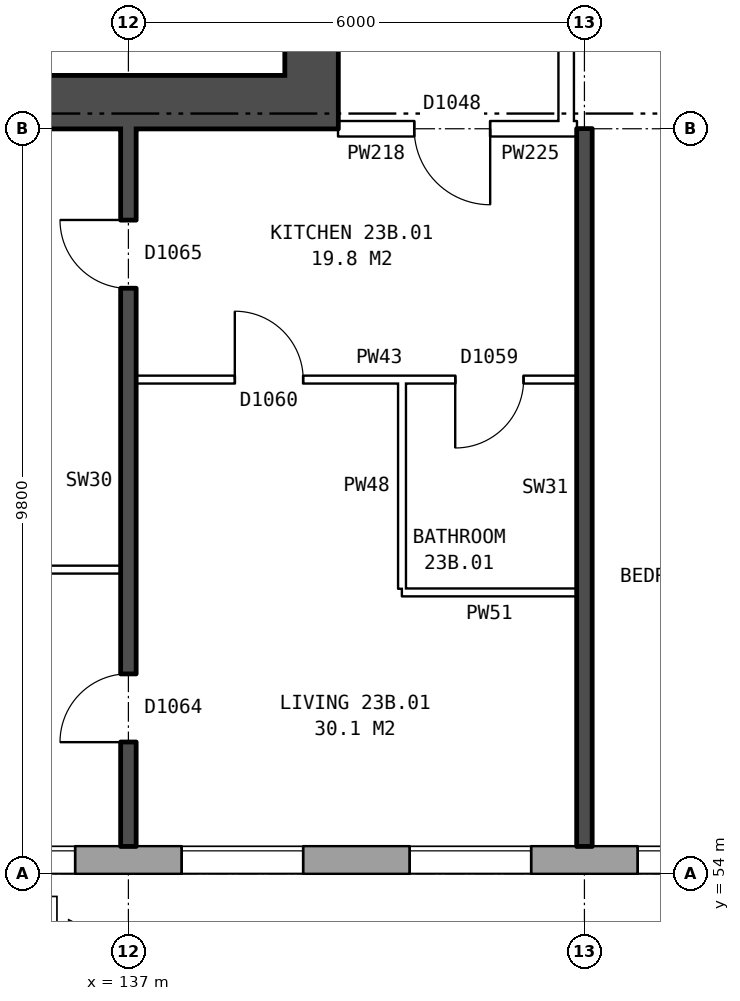
"""IFC4 building model, lengths in metres.
Left out: names, types, materials, properties, quantities, classifications, styles, units other than length and angle.
Written with IfcOpenShell. Run it as: python <this file> out.ifc"""

import sys

from ifc_helpers import new_model, si_unit, direction, frame, frame_2d, origin, place, context, subcontext, project, spatial, rectangle, extrude, element, fill, save


model = new_model("IFC4")
c1 = context("Model", 3, precision=1e-05, world=origin(), true_north=direction((0.0, 1.0)))
c2 = subcontext(c1, "Body", "Model", "MODEL_VIEW")
j1 = project(units=[si_unit("LENGTHUNIT", "METRE"), si_unit("PLANEANGLEUNIT", "RADIAN")], contexts=[c1])
p1 = place(None, origin())
s1 = spatial("IfcSite", under=j1, at=p1, CompositionType="ELEMENT")
p2 = place(p1, origin())
s2 = spatial("IfcBuilding", under=s1, at=p2, CompositionType="ELEMENT")
p3 = place(p2, frame((0.0, 0.0, 84.0)))
s3 = spatial("IfcBuildingStorey", under=s2, at=p3, CompositionType="ELEMENT", Elevation=84.0)
p4 = place(p3, frame((134.075, 54.18, 0.0), z_axis=(0.0, 0.0, 1.0), x_axis=(1.0, 0.0, 0.0)))
e1 = element("IfcWall", 1, at=p4, inside=s3, PredefinedType="STANDARD", context=c2, shape_type="SweptSolid", body=[
    extrude(rectangle(XDim=38.101, YDim=0.36, at=frame_2d((19.05, 0.0))), origin(), (0.0, 0.0, 1.0), 2.85),
])
p5 = place(p4, frame((0.625, 0.0, 0.8)))
e2 = element("IfcOpeningElement", 2, at=p5, cuts=e1, PredefinedType="OPENING", context=c2, shape_type="SweptSolid", body=[
    extrude(rectangle(XDim=1.6, YDim=1.8, at=frame_2d((0.8, 0.9))), frame((0.0, 0.19, 0.0), z_axis=(0.0, -1.0, 0.0), x_axis=(1.0, 0.0, 0.0)), (0.0, 0.0, 1.0), 0.38),
])
p6 = place(p4, frame((3.625, 0.0, 0.8)))
e3 = element("IfcOpeningElement", 3, at=p6, cuts=e1, PredefinedType="OPENING", context=c2, shape_type="SweptSolid", body=[
    extrude(rectangle(XDim=1.6, YDim=1.8, at=frame_2d((0.8, 0.9))), frame((0.0, 0.19, 0.0), z_axis=(0.0, -1.0, 0.0), x_axis=(1.0, 0.0, 0.0)), (0.0, 0.0, 1.0), 0.38),
])
p7 = place(p4, frame((6.625, 0.0, 0.8)))
e4 = element("IfcOpeningElement", 4, at=p7, cuts=e1, PredefinedType="OPENING", context=c2, shape_type="SweptSolid", body=[
    extrude(rectangle(XDim=1.6, YDim=1.8, at=frame_2d((0.8, 0.9))), frame((0.0, 0.19, 0.0), z_axis=(0.0, -1.0, 0.0), x_axis=(1.0, 0.0, 0.0)), (0.0, 0.0, 1.0), 0.38),
])
p8 = place(p4, frame((9.625, 0.0, 0.8)))
e5 = element("IfcOpeningElement", 5, at=p8, cuts=e1, PredefinedType="OPENING", context=c2, shape_type="SweptSolid", body=[
    extrude(rectangle(XDim=1.6, YDim=1.8, at=frame_2d((0.8, 0.9))), frame((0.0, 0.19, 0.0), z_axis=(0.0, -1.0, 0.0), x_axis=(1.0, 0.0, 0.0)), (0.0, 0.0, 1.0), 0.38),
])
p9 = place(p4, frame((12.075, 0.0, 0.8)))
e6 = element("IfcOpeningElement", 6, at=p9, cuts=e1, PredefinedType="OPENING", context=c2, shape_type="SweptSolid", body=[
    extrude(rectangle(XDim=1.4, YDim=1.8, at=frame_2d((0.7, 0.9))), frame((0.0, 0.19, 0.0), z_axis=(0.0, -1.0, 0.0), x_axis=(1.0, 0.0, 0.0)), (0.0, 0.0, 1.0), 0.38),
])
p10 = place(p4, frame((15.475, 0.0, 0.65)))
e7 = element("IfcOpeningElement", 7, at=p10, cuts=e1, PredefinedType="OPENING", context=c2, shape_type="SweptSolid", body=[
    extrude(rectangle(XDim=0.6, YDim=0.9, at=frame_2d((0.3, 0.45))), frame((0.0, 0.19, 0.0), z_axis=(0.0, -1.0, 0.0), x_axis=(1.0, 0.0, 0.0)), (0.0, 0.0, 1.0), 0.38),
])
p11 = place(p4, frame((18.625, 0.0, 0.8)))
e8 = element("IfcOpeningElement", 8, at=p11, cuts=e1, PredefinedType="OPENING", context=c2, shape_type="SweptSolid", body=[
    extrude(rectangle(XDim=1.6, YDim=1.8, at=frame_2d((0.8, 0.9))), frame((0.0, 0.19, 0.0), z_axis=(0.0, -1.0, 0.0), x_axis=(1.0, 0.0, 0.0)), (0.0, 0.0, 1.0), 0.38),
])
p12 = place(p4, frame((21.125, 0.0, 0.8)))
e9 = element("IfcOpeningElement", 9, at=p12, cuts=e1, PredefinedType="OPENING", context=c2, shape_type="SweptSolid", body=[
    extrude(rectangle(XDim=1.0, YDim=1.2, at=frame_2d((0.5, 0.6))), frame((0.0, 0.19, 0.0), z_axis=(0.0, -1.0, 0.0), x_axis=(1.0, 0.0, 0.0)), (0.0, 0.0, 1.0), 0.38),
])
p13 = place(p4, frame((24.625, 0.0, 0.8)))
e10 = element("IfcOpeningElement", 10, at=p13, cuts=e1, PredefinedType="OPENING", context=c2, shape_type="SweptSolid", body=[
    extrude(rectangle(XDim=1.6, YDim=1.8, at=frame_2d((0.8, 0.9))), frame((0.0, 0.19, 0.0), z_axis=(0.0, -1.0, 0.0), x_axis=(1.0, 0.0, 0.0)), (0.0, 0.0, 1.0), 0.38),
])
p14 = place(p4, frame((27.625, 0.0, 0.8)))
e11 = element("IfcOpeningElement", 11, at=p14, cuts=e1, PredefinedType="OPENING", context=c2, shape_type="SweptSolid", body=[
    extrude(rectangle(XDim=1.6, YDim=1.8, at=frame_2d((0.8, 0.9))), frame((0.0, 0.19, 0.0), z_axis=(0.0, -1.0, 0.0), x_axis=(1.0, 0.0, 0.0)), (0.0, 0.0, 1.0), 0.38),
])
p15 = place(p4, frame((30.625, 0.0, 0.8)))
e12 = element("IfcOpeningElement", 12, at=p15, cuts=e1, PredefinedType="OPENING", context=c2, shape_type="SweptSolid", body=[
    extrude(rectangle(XDim=1.6, YDim=1.8, at=frame_2d((0.8, 0.9))), frame((0.0, 0.19, 0.0), z_axis=(0.0, -1.0, 0.0), x_axis=(1.0, 0.0, 0.0)), (0.0, 0.0, 1.0), 0.38),
])
p16 = place(p4, frame((33.625, 0.0, 0.8)))
e13 = element("IfcOpeningElement", 13, at=p16, cuts=e1, PredefinedType="OPENING", context=c2, shape_type="SweptSolid", body=[
    extrude(rectangle(XDim=1.6, YDim=1.8, at=frame_2d((0.8, 0.9))), frame((0.0, 0.19, 0.0), z_axis=(0.0, -1.0, 0.0), x_axis=(1.0, 0.0, 0.0)), (0.0, 0.0, 1.0), 0.38),
])
p17 = place(p4, frame((13.775, 0.0, 1.6)))
e14 = element("IfcOpeningElement", 14, at=p17, cuts=e1, PredefinedType="OPENING", context=c2, shape_type="SweptSolid", body=[
    extrude(rectangle(XDim=0.6, YDim=0.9, at=frame_2d((0.3, 0.45))), frame((0.0, 0.19, 0.0), z_axis=(0.0, -1.0, 0.0), x_axis=(1.0, 0.0, 0.0)), (0.0, 0.0, 1.0), 0.38),
])
p18 = place(p4, frame((16.375, 0.0, 0.65)))
e15 = element("IfcOpeningElement", 15, at=p18, cuts=e1, PredefinedType="OPENING", context=c2, shape_type="SweptSolid", body=[
    extrude(rectangle(XDim=1.4, YDim=1.8, at=frame_2d((0.7, 0.9))), frame((0.0, 0.19, 0.0), z_axis=(0.0, -1.0, 0.0), x_axis=(1.0, 0.0, 0.0)), (0.0, 0.0, 1.0), 0.38),
])
p19 = place(p4, frame((23.625, 0.0, 1.7)))
e16 = element("IfcOpeningElement", 16, at=p19, cuts=e1, PredefinedType="OPENING", context=c2, shape_type="SweptSolid", body=[
    extrude(rectangle(XDim=0.6, YDim=0.9, at=frame_2d((0.3, 0.45))), frame((0.0, 0.19, 0.0), z_axis=(0.0, -1.0, 0.0), x_axis=(1.0, 0.0, 0.0)), (0.0, 0.0, 1.0), 0.38),
])
p20 = place(p3, frame((139.41, 64.5, 0.0), z_axis=(0.0, 0.0, 1.0), x_axis=(0.0, 1.0, 0.0)))
e17 = element("IfcWall", 17, at=p20, inside=s3, PredefinedType="SHEAR", context=c2, shape_type="SweptSolid", body=[
    extrude(rectangle(XDim=11.0, YDim=0.7, at=frame_2d((5.5, 0.0))), origin(), (0.0, 0.0, 1.0), 2.85),
])
p21 = place(p20, frame((0.625, 0.0, 0.0)))
e18 = element("IfcOpeningElement", 18, at=p21, cuts=e17, PredefinedType="OPENING", context=c2, shape_type="SweptSolid", body=[
    extrude(rectangle(XDim=1.1, YDim=2.1, at=frame_2d((0.55, 1.05))), frame((0.0, 0.36, 0.0), z_axis=(0.0, -1.0, 0.0), x_axis=(1.0, 0.0, 0.0)), (0.0, 0.0, 1.0), 0.72),
])
p22 = place(p20, frame((9.2, 0.0, 0.0)))
e19 = element("IfcOpeningElement", 19, at=p22, cuts=e17, PredefinedType="OPENING", context=c2, shape_type="SweptSolid", body=[
    extrude(rectangle(XDim=1.1, YDim=2.1, at=frame_2d((0.55, 1.05))), frame((0.0, 0.36, 0.0), z_axis=(0.0, -1.0, 0.0), x_axis=(1.0, 0.0, 0.0)), (0.0, 0.0, 1.0), 0.72),
])
p23 = place(p20, frame((7.425, 0.0, 0.0)))
e20 = element("IfcOpeningElement", 20, at=p23, cuts=e17, PredefinedType="OPENING", context=c2, shape_type="SweptSolid", body=[
    extrude(rectangle(XDim=0.85, YDim=2.1, at=frame_2d((0.425, 1.05))), frame((0.0, 0.36, 0.0), z_axis=(0.0, -1.0, 0.0), x_axis=(1.0, 0.0, 0.0)), (0.0, 0.0, 1.0), 0.72),
])
p24 = place(p3, frame((139.76, 64.15, 0.0), z_axis=(0.0, 0.0, 1.0), x_axis=(-1.0, 0.0, 0.0)))
e21 = element("IfcWall", 21, at=p24, inside=s3, PredefinedType="SHEAR", context=c2, shape_type="SweptSolid", body=[
    extrude(rectangle(XDim=8.4, YDim=0.7, at=frame_2d((4.2, 0.0))), origin(), (0.0, 0.0, 1.0), 2.85),
])
p25 = place(p3, frame((142.76, 63.9, 0.0), z_axis=(0.0, 0.0, 1.0), x_axis=(0.0, 1.0, 0.0)))
e22 = element("IfcWall", 22, at=p25, inside=s3, PredefinedType="PARTITIONING", context=c2, shape_type="SweptSolid", body=[
    extrude(rectangle(XDim=12.2, YDim=0.2, at=frame_2d((6.1, 0.0))), origin(), (0.0, 0.0, 1.0), 2.85),
])
p26 = place(p25, frame((5.1, 0.0, 0.0)))
e23 = element("IfcOpeningElement", 23, at=p26, cuts=e22, PredefinedType="OPENING", context=c2, shape_type="SweptSolid", body=[
    extrude(rectangle(XDim=2.0, YDim=2.1, at=frame_2d((1.0, 1.05))), frame((0.0, 0.11, 0.0), z_axis=(0.0, -1.0, 0.0), x_axis=(1.0, 0.0, 0.0)), (0.0, 0.0, 1.0), 0.22),
])
p27 = place(p3, frame((140.6, 57.7, 0.0), z_axis=(0.0, 0.0, 1.0), x_axis=(1.0, 0.0, 0.0)))
e24 = element("IfcWall", 24, at=p27, inside=s3, PredefinedType="PARTITIONING", context=c2, shape_type="SweptSolid", body=[
    extrude(rectangle(XDim=2.3, YDim=0.1, at=frame_2d((1.15, 0.0))), origin(), (0.0, 0.0, 1.0), 2.85),
])
p28 = place(p3, frame((131.36, 58.0, 0.0), z_axis=(0.0, 0.0, 1.0), x_axis=(1.0, 0.0, 0.0)))
e25 = element("IfcWall", 25, at=p28, inside=s3, PredefinedType="PARTITIONING", context=c2, shape_type="SweptSolid", body=[
    extrude(rectangle(XDim=5.54, YDim=0.1, at=frame_2d((2.77, 0.0))), origin(), (0.0, 0.0, 1.0), 2.85),
])
p29 = place(p3, frame((137.1, 60.5, 0.0), z_axis=(0.0, 0.0, 1.0), x_axis=(1.0, 0.0, 0.0)))
e26 = element("IfcWall", 26, at=p29, inside=s3, PredefinedType="PARTITIONING", context=c2, shape_type="SweptSolid", body=[
    extrude(rectangle(XDim=5.8, YDim=0.1, at=frame_2d((2.9, 0.0))), origin(), (0.0, 0.0, 1.0), 2.85),
])
p30 = place(p29, frame((1.3, 0.0, 0.0)))
e27 = element("IfcOpeningElement", 27, at=p30, cuts=e26, PredefinedType="OPENING", context=c2, shape_type="SweptSolid", body=[
    extrude(rectangle(XDim=0.9, YDim=2.1, at=frame_2d((0.45, 1.05))), frame((0.0, 0.06, 0.0), z_axis=(0.0, -1.0, 0.0), x_axis=(1.0, 0.0, 0.0)), (0.0, 0.0, 1.0), 0.12),
])
p31 = place(p29, frame((4.2, 0.0, 0.0)))
e28 = element("IfcOpeningElement", 28, at=p31, cuts=e26, PredefinedType="OPENING", context=c2, shape_type="SweptSolid", body=[
    extrude(rectangle(XDim=0.9, YDim=2.1, at=frame_2d((0.45, 1.05))), frame((0.0, 0.06, 0.0), z_axis=(0.0, -1.0, 0.0), x_axis=(1.0, 0.0, 0.0)), (0.0, 0.0, 1.0), 0.12),
])
p32 = place(p3, frame((139.76, 63.8, 0.0), z_axis=(0.0, 0.0, 1.0), x_axis=(1.0, 0.0, 0.0)))
e29 = element("IfcWall", 29, at=p32, inside=s3, PredefinedType="PARTITIONING", context=c2, shape_type="SweptSolid", body=[
    extrude(rectangle(XDim=3.0, YDim=0.2, at=frame_2d((1.5, 0.0))), origin(), (0.0, 0.0, 1.0), 2.85),
])
p33 = place(p32, frame((1.0, 0.0, 0.0)))
e30 = element("IfcOpeningElement", 30, at=p33, cuts=e29, PredefinedType="OPENING", context=c2, shape_type="SweptSolid", body=[
    extrude(rectangle(XDim=1.0, YDim=2.1, at=frame_2d((0.5, 1.05))), frame((0.0, 0.11, 0.0), z_axis=(0.0, -1.0, 0.0), x_axis=(1.0, 0.0, 0.0)), (0.0, 0.0, 1.0), 0.22),
])
p34 = place(p3, frame((142.76, 63.8, 0.0), z_axis=(0.0, 0.0, 1.0), x_axis=(1.0, 0.0, 0.0)))
e31 = element("IfcWall", 31, at=p34, inside=s3, PredefinedType="PARTITIONING", context=c2, shape_type="SweptSolid", body=[
    extrude(rectangle(XDim=0.14, YDim=0.2, at=frame_2d((0.07, 0.0))), origin(), (0.0, 0.0, 1.0), 2.85),
])
p35 = place(p3, frame((137.0, 54.36, 0.0), z_axis=(0.0, 0.0, 1.0), x_axis=(0.0, 1.0, 0.0)))
e32 = element("IfcWall", 32, at=p35, inside=s3, PredefinedType="SOLIDWALL", context=c2, shape_type="SweptSolid", body=[
    extrude(rectangle(XDim=9.44, YDim=0.2, at=frame_2d((4.72, 0.0))), origin(), (0.0, 0.0, 1.0), 2.85),
])
p36 = place(p35, frame((1.37, 0.0, 0.0)))
e33 = element("IfcOpeningElement", 33, at=p36, cuts=e32, PredefinedType="OPENING", context=c2, shape_type="SweptSolid", body=[
    extrude(rectangle(XDim=0.9, YDim=2.1, at=frame_2d((0.45, 1.05))), frame((0.0, 0.11, 0.0), z_axis=(0.0, -1.0, 0.0), x_axis=(1.0, 0.0, 0.0)), (0.0, 0.0, 1.0), 0.22),
])
p37 = place(p35, frame((7.34, 0.0, 0.0)))
e34 = element("IfcOpeningElement", 34, at=p37, cuts=e32, PredefinedType="OPENING", context=c2, shape_type="SweptSolid", body=[
    extrude(rectangle(XDim=0.9, YDim=2.1, at=frame_2d((0.45, 1.05))), frame((0.0, 0.11, 0.0), z_axis=(0.0, -1.0, 0.0), x_axis=(1.0, 0.0, 0.0)), (0.0, 0.0, 1.0), 0.22),
])
p38 = place(p3, frame((140.6, 57.75, 0.0), z_axis=(0.0, 0.0, 1.0), x_axis=(0.0, 1.0, 0.0)))
e35 = element("IfcWall", 35, at=p38, inside=s3, PredefinedType="PARTITIONING", context=c2, shape_type="SweptSolid", body=[
    extrude(rectangle(XDim=2.7, YDim=0.1, at=frame_2d((1.35, 0.0))), origin(), (0.0, 0.0, 1.0), 2.85),
])
p39 = place(p3, frame((143.0, 54.36, 0.0), z_axis=(0.0, 0.0, 1.0), x_axis=(0.0, 1.0, 0.0)))
e36 = element("IfcWall", 36, at=p39, inside=s3, PredefinedType="SOLIDWALL", context=c2, shape_type="SweptSolid", body=[
    extrude(rectangle(XDim=9.44, YDim=0.2, at=frame_2d((4.72, 0.0))), origin(), (0.0, 0.0, 1.0), 2.85),
])
p40 = place(p5, origin())
e37 = element("IfcWindow", 37, at=p40, inside=s3, PartitioningType="SINGLE_PANEL", PredefinedType="WINDOW", context=c2, shape_type="SweptSolid", body=[
    extrude(rectangle(XDim=1.6, YDim=1.8, at=frame_2d((0.8, 0.9))), frame((0.0, 0.15, 0.0), z_axis=(0.0, -1.0, 0.0), x_axis=(1.0, 0.0, 0.0)), (0.0, 0.0, 1.0), 0.06),
])
fill(e2, e37)
p41 = place(p6, origin())
e38 = element("IfcWindow", 38, at=p41, inside=s3, PartitioningType="SINGLE_PANEL", PredefinedType="WINDOW", context=c2, shape_type="SweptSolid", body=[
    extrude(rectangle(XDim=1.6, YDim=1.8, at=frame_2d((0.8, 0.9))), frame((0.0, 0.15, 0.0), z_axis=(0.0, -1.0, 0.0), x_axis=(1.0, 0.0, 0.0)), (0.0, 0.0, 1.0), 0.06),
])
fill(e3, e38)
p42 = place(p7, origin())
e39 = element("IfcWindow", 39, at=p42, inside=s3, PartitioningType="SINGLE_PANEL", PredefinedType="WINDOW", context=c2, shape_type="SweptSolid", body=[
    extrude(rectangle(XDim=1.6, YDim=1.8, at=frame_2d((0.8, 0.9))), frame((0.0, 0.15, 0.0), z_axis=(0.0, -1.0, 0.0), x_axis=(1.0, 0.0, 0.0)), (0.0, 0.0, 1.0), 0.06),
])
fill(e4, e39)
p43 = place(p8, origin())
e40 = element("IfcWindow", 40, at=p43, inside=s3, PartitioningType="SINGLE_PANEL", PredefinedType="WINDOW", context=c2, shape_type="SweptSolid", body=[
    extrude(rectangle(XDim=1.6, YDim=1.8, at=frame_2d((0.8, 0.9))), frame((0.0, 0.15, 0.0), z_axis=(0.0, -1.0, 0.0), x_axis=(1.0, 0.0, 0.0)), (0.0, 0.0, 1.0), 0.06),
])
fill(e5, e40)
p44 = place(p36, origin())
e41 = element("IfcDoor", 41, at=p44, inside=s3, OperationType="SINGLE_SWING_LEFT", PredefinedType="DOOR", context=c2, shape_type="SweptSolid", body=[
    extrude(rectangle(XDim=0.9, YDim=2.1, at=frame_2d((0.45, 1.05))), frame((0.0, 0.025, 0.0), z_axis=(0.0, -1.0, 0.0), x_axis=(1.0, 0.0, 0.0)), (0.0, 0.0, 1.0), 0.05),
])
fill(e33, e41)
p45 = place(p37, origin())
e42 = element("IfcDoor", 42, at=p45, inside=s3, OperationType="SINGLE_SWING_RIGHT", PredefinedType="DOOR", context=c2, shape_type="SweptSolid", body=[
    extrude(rectangle(XDim=0.9, YDim=2.1, at=frame_2d((0.45, 1.05))), frame((0.0, 0.025, 0.0), z_axis=(0.0, -1.0, 0.0), x_axis=(1.0, 0.0, 0.0)), (0.0, 0.0, 1.0), 0.05),
])
fill(e34, e42)
p46 = place(p33, frame((1.0, 0.0, 0.0), z_axis=(0.0, 0.0, 1.0), x_axis=(-1.0, 0.0, 0.0)))
e43 = element("IfcDoor", 43, at=p46, inside=s3, OperationType="SINGLE_SWING_LEFT", PredefinedType="DOOR", context=c2, shape_type="SweptSolid", body=[
    extrude(rectangle(XDim=1.0, YDim=2.1, at=frame_2d((0.5, 1.05))), frame((0.0, 0.025, 0.0), z_axis=(0.0, -1.0, 0.0), x_axis=(1.0, 0.0, 0.0)), (0.0, 0.0, 1.0), 0.05),
])
fill(e30, e43)
p47 = place(p30, origin())
e44 = element("IfcDoor", 44, at=p47, inside=s3, OperationType="SINGLE_SWING_LEFT", PredefinedType="DOOR", context=c2, shape_type="SweptSolid", body=[
    extrude(rectangle(XDim=0.9, YDim=2.1, at=frame_2d((0.45, 1.05))), frame((0.0, 0.025, 0.0), z_axis=(0.0, -1.0, 0.0), x_axis=(1.0, 0.0, 0.0)), (0.0, 0.0, 1.0), 0.05),
])
fill(e27, e44)
p48 = place(p31, frame((0.9, 0.0, 0.0), z_axis=(0.0, 0.0, 1.0), x_axis=(-1.0, 0.0, 0.0)))
e45 = element("IfcDoor", 45, at=p48, inside=s3, OperationType="SINGLE_SWING_RIGHT", PredefinedType="DOOR", context=c2, shape_type="SweptSolid", body=[
    extrude(rectangle(XDim=0.9, YDim=2.1, at=frame_2d((0.45, 1.05))), frame((0.0, 0.025, 0.0), z_axis=(0.0, -1.0, 0.0), x_axis=(1.0, 0.0, 0.0)), (0.0, 0.0, 1.0), 0.05),
])
fill(e28, e45)
save(model, sys.argv[1])
